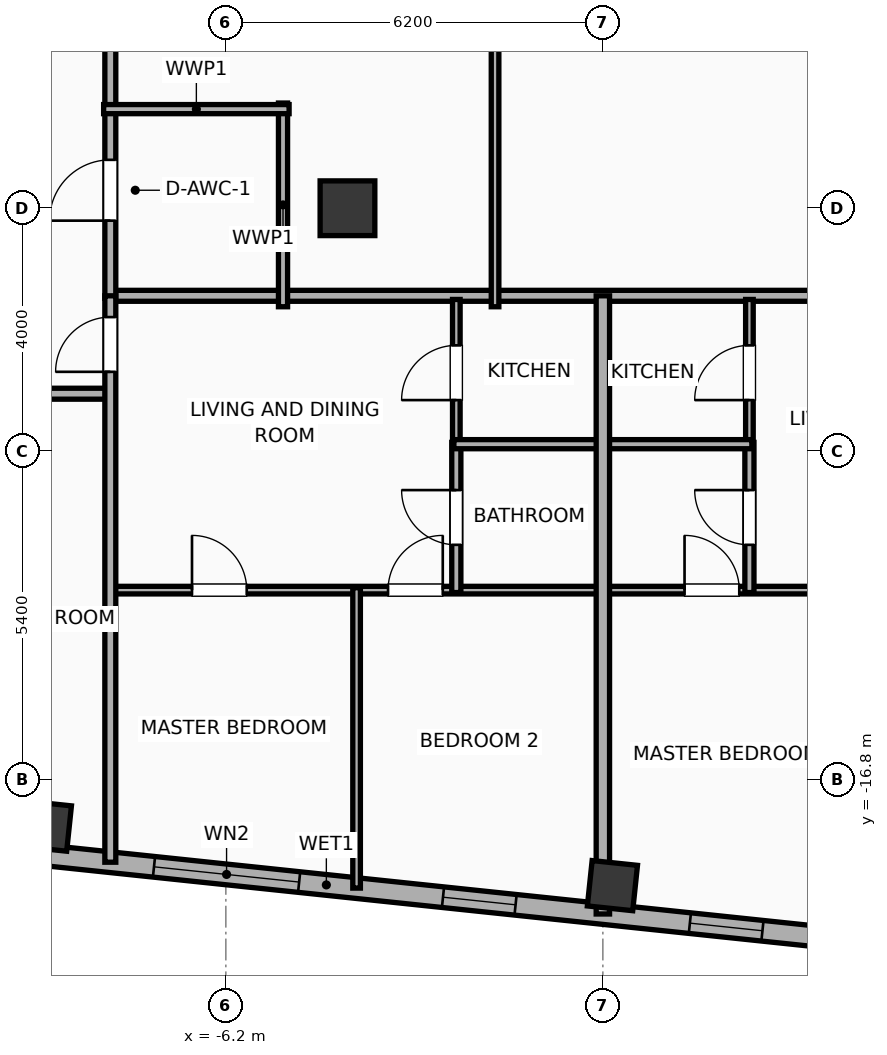
"""IFC4 building model, lengths in metres.
Left out: names, types, materials, properties, quantities, classifications, styles, units other than length and angle.
Written with IfcOpenShell. Run it as: python <this file> out.ifc"""

import sys

from ifc_helpers import new_model, si_unit, direction, frame, frame_2d, origin, origin_2d, place, context, subcontext, project, spatial, rectangle, hollow_rectangle, extrude, element, fill, save


model = new_model("IFC4")
c1 = context("Model", 3, precision=1e-05, world=origin(), true_north=direction((0.0, 1.0)))
c2 = subcontext(c1, "Body", "Model", "MODEL_VIEW")
j1 = project(units=[si_unit("LENGTHUNIT", "METRE"), si_unit("PLANEANGLEUNIT", "RADIAN")], contexts=[c1])
p1 = place(None, origin())
s1 = spatial("IfcSite", under=j1, at=p1, CompositionType="ELEMENT")
p2 = place(p1, origin())
s2 = spatial("IfcBuilding", under=s1, at=p2, CompositionType="ELEMENT")
p3 = place(p2, frame((0.0, 0.0, 263.9)))
s3 = spatial("IfcBuildingStorey", under=s2, at=p3, CompositionType="ELEMENT", Elevation=263.9)
p4 = place(p3, frame((-4.2, -7.4, 0.0), z_axis=(0.0, 0.0, 1.0), x_axis=(1.0, 0.0, 0.0)))
e1 = element("IfcColumn", 1, at=p4, inside=s3, PredefinedType="COLUMN", context=c2, shape_type="SweptSolid", body=[
    extrude(rectangle(XDim=0.9, YDim=0.9, at=origin_2d()), origin(), (0.0, 0.0, 1.0), 3.9),
])
for number, where, z_axis, x_axis in (
    (2, (-9.152, -17.561, 0.0), (0.0, 0.0, 1.0), (0.995, -0.105, 0.0)),
    (3, (0.157, -18.54, 0.0), (0.0, 0.0, 1.0), (0.995, -0.105, 0.0)),
):
    element("IfcColumn", number, at=place(p3, frame(where, z_axis=z_axis, x_axis=x_axis)), inside=s3, PredefinedType="COLUMN", context=c2, shape_type="SweptSolid", body=[
        extrude(hollow_rectangle(XDim=0.75, YDim=0.75, WallThickness=0.025, at=origin_2d()), origin(), (0.0, 0.0, 1.0), 3.9),
    ])
p5 = place(p3, frame((18.708, -20.972, 0.0), z_axis=(0.0, 0.0, 1.0), x_axis=(-0.994521888554, 0.104528528102, 0.0)))
e4 = element("IfcWall", 4, at=p5, inside=s3, PredefinedType="ELEMENTEDWALL", context=c2, shape_type="SweptSolid", body=[
    extrude(rectangle(XDim=46.766, YDim=0.34, at=frame_2d((23.383, 0.0))), origin(), (0.0, 0.0, 1.0), 3.65),
])
p6 = place(p5, frame((23.833, 0.0, 0.75)))
e5 = element("IfcOpeningElement", 5, at=p6, cuts=e4, PredefinedType="OPENING", context=c2, shape_type="SweptSolid", body=[
    extrude(rectangle(XDim=2.4, YDim=2.1, at=frame_2d((1.2, 1.05))), frame((0.0, 0.18, 0.0), z_axis=(0.0, -1.0, 0.0), x_axis=(1.0, 0.0, 0.0)), (0.0, 0.0, 1.0), 0.36),
])
p7 = place(p5, frame((38.622, 0.0, 0.75)))
e6 = element("IfcOpeningElement", 6, at=p7, cuts=e4, PredefinedType="OPENING", context=c2, shape_type="SweptSolid", body=[
    extrude(rectangle(XDim=2.4, YDim=2.1, at=frame_2d((1.2, 1.05))), frame((0.0, 0.18, 0.0), z_axis=(0.0, -1.0, 0.0), x_axis=(1.0, 0.0, 0.0)), (0.0, 0.0, 1.0), 0.36),
])
p8 = place(p5, frame((44.402, 0.0, 0.75)))
e7 = element("IfcOpeningElement", 7, at=p8, cuts=e4, PredefinedType="OPENING", context=c2, shape_type="SweptSolid", body=[
    extrude(rectangle(XDim=1.2, YDim=2.05, at=frame_2d((0.6, 1.025))), frame((0.0, 0.18, 0.0), z_axis=(0.0, -1.0, 0.0), x_axis=(1.0, 0.0, 0.0)), (0.0, 0.0, 1.0), 0.36),
])
p9 = place(p5, frame((42.406, 0.0, 0.75)))
e8 = element("IfcOpeningElement", 8, at=p9, cuts=e4, PredefinedType="OPENING", context=c2, shape_type="SweptSolid", body=[
    extrude(rectangle(XDim=1.2, YDim=2.05, at=frame_2d((0.6, 1.025))), frame((0.0, 0.18, 0.0), z_axis=(0.0, -1.0, 0.0), x_axis=(1.0, 0.0, 0.0)), (0.0, 0.0, 1.0), 0.36),
])
p10 = place(p5, frame((34.933, 0.0, 0.75)))
e9 = element("IfcOpeningElement", 9, at=p10, cuts=e4, PredefinedType="OPENING", context=c2, shape_type="SweptSolid", body=[
    extrude(rectangle(XDim=1.2, YDim=2.05, at=frame_2d((0.6, 1.025))), frame((0.0, 0.18, 0.0), z_axis=(0.0, -1.0, 0.0), x_axis=(1.0, 0.0, 0.0)), (0.0, 0.0, 1.0), 0.36),
])
p11 = place(p5, frame((28.631, 0.0, 0.75)))
e10 = element("IfcOpeningElement", 10, at=p11, cuts=e4, PredefinedType="OPENING", context=c2, shape_type="SweptSolid", body=[
    extrude(rectangle(XDim=1.2, YDim=2.05, at=frame_2d((0.6, 1.025))), frame((0.0, 0.18, 0.0), z_axis=(0.0, -1.0, 0.0), x_axis=(1.0, 0.0, 0.0)), (0.0, 0.0, 1.0), 0.36),
])
p12 = place(p5, frame((30.896, 0.0, 0.75)))
e11 = element("IfcOpeningElement", 11, at=p12, cuts=e4, PredefinedType="OPENING", context=c2, shape_type="SweptSolid", body=[
    extrude(rectangle(XDim=1.2, YDim=2.05, at=frame_2d((0.6, 1.025))), frame((0.0, 0.18, 0.0), z_axis=(0.0, -1.0, 0.0), x_axis=(1.0, 0.0, 0.0)), (0.0, 0.0, 1.0), 0.36),
])
p13 = place(p5, frame((7.501, 0.0, 0.75)))
e12 = element("IfcOpeningElement", 12, at=p13, cuts=e4, PredefinedType="OPENING", context=c2, shape_type="SweptSolid", body=[
    extrude(rectangle(XDim=1.2, YDim=2.05, at=frame_2d((0.6, 1.025))), frame((0.0, 0.18, 0.0), z_axis=(0.0, -1.0, 0.0), x_axis=(1.0, 0.0, 0.0)), (0.0, 0.0, 1.0), 0.36),
])
p14 = place(p5, frame((4.159, 0.0, 0.75)))
e13 = element("IfcOpeningElement", 13, at=p14, cuts=e4, PredefinedType="OPENING", context=c2, shape_type="SweptSolid", body=[
    extrude(rectangle(XDim=1.2, YDim=2.05, at=frame_2d((0.6, 1.025))), frame((0.0, 0.18, 0.0), z_axis=(0.0, -1.0, 0.0), x_axis=(1.0, 0.0, 0.0)), (0.0, 0.0, 1.0), 0.36),
])
p15 = place(p5, frame((1.369, 0.0, 0.75)))
e14 = element("IfcOpeningElement", 14, at=p15, cuts=e4, PredefinedType="OPENING", context=c2, shape_type="SweptSolid", body=[
    extrude(rectangle(XDim=1.2, YDim=2.05, at=frame_2d((0.6, 1.025))), frame((0.0, 0.18, 0.0), z_axis=(0.0, -1.0, 0.0), x_axis=(1.0, 0.0, 0.0)), (0.0, 0.0, 1.0), 0.36),
])
p16 = place(p5, frame((20.254, 0.0, 0.75)))
e15 = element("IfcOpeningElement", 15, at=p16, cuts=e4, PredefinedType="OPENING", context=c2, shape_type="SweptSolid", body=[
    extrude(rectangle(XDim=1.2, YDim=2.05, at=frame_2d((0.6, 1.025))), frame((0.0, 0.18, 0.0), z_axis=(0.0, -1.0, 0.0), x_axis=(1.0, 0.0, 0.0)), (0.0, 0.0, 1.0), 0.36),
])
p17 = place(p5, frame((16.172, 0.0, 0.75)))
e16 = element("IfcOpeningElement", 16, at=p17, cuts=e4, PredefinedType="OPENING", context=c2, shape_type="SweptSolid", body=[
    extrude(rectangle(XDim=1.2, YDim=2.05, at=frame_2d((0.6, 1.025))), frame((0.0, 0.18, 0.0), z_axis=(0.0, -1.0, 0.0), x_axis=(1.0, 0.0, 0.0)), (0.0, 0.0, 1.0), 0.36),
])
p18 = place(p5, frame((12.11, 0.0, 0.75)))
e17 = element("IfcOpeningElement", 17, at=p18, cuts=e4, PredefinedType="OPENING", context=c2, shape_type="SweptSolid", body=[
    extrude(rectangle(XDim=1.2, YDim=2.05, at=frame_2d((0.6, 1.025))), frame((0.0, 0.18, 0.0), z_axis=(0.0, -1.0, 0.0), x_axis=(1.0, 0.0, 0.0)), (0.0, 0.0, 1.0), 0.36),
])
p19 = place(p3, frame((-8.15, -8.84, 0.0), z_axis=(0.0, 0.0, 1.0), x_axis=(1.0, 0.0, 0.0)))
e18 = element("IfcWall", 18, at=p19, inside=s3, PredefinedType="PARTITIONING", context=c2, shape_type="SweptSolid", body=[
    extrude(rectangle(XDim=16.3, YDim=0.18, at=frame_2d((8.15, 0.0))), origin(), (0.0, 0.0, 1.0), 3.65),
])
p20 = place(p3, frame((-8.1, -8.88, 0.0), z_axis=(0.0, 0.0, 1.0), x_axis=(0.0, 1.0, 0.0)))
e19 = element("IfcWall", 19, at=p20, inside=s3, PredefinedType="PARTITIONING", context=c2, shape_type="SweptSolid", body=[
    extrude(rectangle(XDim=17.76, YDim=0.18, at=frame_2d((8.88, 0.0))), origin(), (0.0, 0.0, 1.0), 3.65),
])
p21 = place(p20, frame((1.276, 0.0, 0.0)))
e20 = element("IfcOpeningElement", 20, at=p21, cuts=e19, PredefinedType="OPENING", context=c2, shape_type="SweptSolid", body=[
    extrude(rectangle(XDim=1.0, YDim=2.05, at=frame_2d((0.5, 1.025))), frame((0.0, 0.1, 0.0), z_axis=(0.0, -1.0, 0.0), x_axis=(1.0, 0.0, 0.0)), (0.0, 0.0, 1.0), 0.2),
])
p22 = place(p20, frame((10.181, 0.0, 0.0)))
e21 = element("IfcOpeningElement", 21, at=p22, cuts=e19, PredefinedType="OPENING", context=c2, shape_type="SweptSolid", body=[
    extrude(rectangle(XDim=0.95, YDim=2.05, at=frame_2d((0.475, 1.025))), frame((0.0, 0.1, 0.0), z_axis=(0.0, -1.0, 0.0), x_axis=(1.0, 0.0, 0.0)), (0.0, 0.0, 1.0), 0.2),
])
p23 = place(p3, frame((-5.26, -9.02, 0.0), z_axis=(0.0, 0.0, 1.0), x_axis=(0.0, 1.0, 0.0)))
e22 = element("IfcWall", 22, at=p23, inside=s3, PredefinedType="PLUMBINGWALL", context=c2, shape_type="SweptSolid", body=[
    extrude(rectangle(XDim=3.35, YDim=0.15, at=frame_2d((1.675, 0.0))), origin(), (0.0, 0.0, 1.0), 3.65),
])
p24 = place(p3, frame((-8.21, -5.77, 0.0), z_axis=(0.0, 0.0, 1.0), x_axis=(1.0, 0.0, 0.0)))
e23 = element("IfcWall", 23, at=p24, inside=s3, PredefinedType="PLUMBINGWALL", context=c2, shape_type="SweptSolid", body=[
    extrude(rectangle(XDim=3.05, YDim=0.15, at=frame_2d((1.525, 0.0))), origin(), (0.0, 0.0, 1.0), 3.65),
])
p25 = place(p3, frame((-1.773, -9.02, 0.0), z_axis=(0.0, 0.0, 1.0), x_axis=(0.0, 1.0, 0.0)))
e24 = element("IfcWall", 24, at=p25, inside=s3, PredefinedType="PARTITIONING", context=c2, shape_type="SweptSolid", body=[
    extrude(rectangle(XDim=17.99, YDim=0.125, at=frame_2d((8.995, 0.0))), origin(), (0.0, 0.0, 1.0), 3.65),
])
p26 = place(p25, frame((8.52, 0.0, 0.0)))
e25 = element("IfcOpeningElement", 25, at=p26, cuts=e24, PredefinedType="OPENING", context=c2, shape_type="SweptSolid", body=[
    extrude(rectangle(XDim=0.95, YDim=2.05, at=frame_2d((0.475, 1.025))), frame((0.0, 0.073, 0.0), z_axis=(0.0, -1.0, 0.0), x_axis=(1.0, 0.0, 0.0)), (0.0, 0.0, 1.0), 0.145),
])
p27 = place(p3, frame((-30.676, -10.45, 0.0), z_axis=(0.0, 0.0, 1.0), x_axis=(1.0, 0.0, 0.0)))
e26 = element("IfcWall", 26, at=p27, inside=s3, PredefinedType="PARTITIONING", context=c2, shape_type="SweptSolid", body=[
    extrude(rectangle(XDim=22.596, YDim=0.18, at=frame_2d((11.298, 0.0))), origin(), (0.0, 0.0, 1.0), 3.65),
])
p28 = place(p27, frame((2.336, 0.0, 0.0)))
e27 = element("IfcOpeningElement", 27, at=p28, cuts=e26, PredefinedType="OPENING", context=c2, shape_type="SweptSolid", body=[
    extrude(rectangle(XDim=0.9, YDim=2.05, at=frame_2d((0.45, 1.025))), frame((0.0, 0.1, 0.0), z_axis=(0.0, -1.0, 0.0), x_axis=(1.0, 0.0, 0.0)), (0.0, 0.0, 1.0), 0.2),
])
p29 = place(p27, frame((8.861, 0.0, 0.0)))
e28 = element("IfcOpeningElement", 28, at=p29, cuts=e26, PredefinedType="OPENING", context=c2, shape_type="SweptSolid", body=[
    extrude(rectangle(XDim=1.15, YDim=2.05, at=frame_2d((0.575, 1.025))), frame((0.0, 0.1, 0.0), z_axis=(0.0, -1.0, 0.0), x_axis=(1.0, 0.0, 0.0)), (0.0, 0.0, 1.0), 0.2),
])
p30 = place(p27, frame((13.774, 0.0, 0.0)))
e29 = element("IfcOpeningElement", 29, at=p30, cuts=e26, PredefinedType="OPENING", context=c2, shape_type="SweptSolid", body=[
    extrude(rectangle(XDim=0.9, YDim=2.05, at=frame_2d((0.45, 1.025))), frame((0.0, 0.1, 0.0), z_axis=(0.0, -1.0, 0.0), x_axis=(1.0, 0.0, 0.0)), (0.0, 0.0, 1.0), 0.2),
])
p31 = place(p27, frame((20.306, 0.0, 0.0)))
e30 = element("IfcOpeningElement", 30, at=p31, cuts=e26, PredefinedType="OPENING", context=c2, shape_type="SweptSolid", body=[
    extrude(rectangle(XDim=1.15, YDim=2.05, at=frame_2d((0.575, 1.025))), frame((0.0, 0.1, 0.0), z_axis=(0.0, -1.0, 0.0), x_axis=(1.0, 0.0, 0.0)), (0.0, 0.0, 1.0), 0.2),
])
p32 = place(p3, frame((-8.08, -13.68, 0.0), z_axis=(0.0, 0.0, 1.0), x_axis=(1.0, 0.0, 0.0)))
e31 = element("IfcWall", 31, at=p32, inside=s3, PredefinedType="PARTITIONING", context=c2, shape_type="SweptSolid", body=[
    extrude(rectangle(XDim=8.06, YDim=0.125, at=frame_2d((4.03, 0.0))), origin(), (0.0, 0.0, 1.0), 3.65),
])
p33 = place(p32, frame((1.323, 0.0, 0.0)))
e32 = element("IfcOpeningElement", 32, at=p33, cuts=e31, PredefinedType="OPENING", context=c2, shape_type="SweptSolid", body=[
    extrude(rectangle(XDim=0.9, YDim=2.05, at=frame_2d((0.45, 1.025))), frame((0.0, 0.073, 0.0), z_axis=(0.0, -1.0, 0.0), x_axis=(1.0, 0.0, 0.0)), (0.0, 0.0, 1.0), 0.145),
])
p34 = place(p32, frame((4.547, 0.0, 0.0)))
e33 = element("IfcOpeningElement", 33, at=p34, cuts=e31, PredefinedType="OPENING", context=c2, shape_type="SweptSolid", body=[
    extrude(rectangle(XDim=0.9, YDim=2.05, at=frame_2d((0.45, 1.025))), frame((0.0, 0.073, 0.0), z_axis=(0.0, -1.0, 0.0), x_axis=(1.0, 0.0, 0.0)), (0.0, 0.0, 1.0), 0.145),
])
p35 = place(p3, frame((-2.41, -11.31, 0.0), z_axis=(0.0, 0.0, 1.0), x_axis=(0.0, 1.0, 0.0)))
e34 = element("IfcWall", 34, at=p35, inside=s3, PredefinedType="PARTITIONING", context=c2, shape_type="SweptSolid", body=[
    extrude(rectangle(XDim=2.41, YDim=0.125, at=frame_2d((1.205, 0.0))), origin(), (0.0, 0.0, 1.0), 3.65),
])
p36 = place(p35, frame((0.755, 0.0, 0.0)))
e35 = element("IfcOpeningElement", 35, at=p36, cuts=e34, PredefinedType="OPENING", context=c2, shape_type="SweptSolid", body=[
    extrude(rectangle(XDim=0.9, YDim=2.05, at=frame_2d((0.45, 1.025))), frame((0.0, 0.073, 0.0), z_axis=(0.0, -1.0, 0.0), x_axis=(1.0, 0.0, 0.0)), (0.0, 0.0, 1.0), 0.145),
])
p37 = place(p3, frame((-2.41, -13.72, 0.0), z_axis=(0.0, 0.0, 1.0), x_axis=(0.0, 1.0, 0.0)))
e36 = element("IfcWall", 36, at=p37, inside=s3, PredefinedType="PLUMBINGWALL", context=c2, shape_type="SweptSolid", body=[
    extrude(rectangle(XDim=2.47, YDim=0.15, at=frame_2d((1.235, 0.0))), origin(), (0.0, 0.0, 1.0), 3.65),
])
p38 = place(p37, frame((0.785, 0.0, 0.0)))
e37 = element("IfcOpeningElement", 37, at=p38, cuts=e36, PredefinedType="OPENING", context=c2, shape_type="SweptSolid", body=[
    extrude(rectangle(XDim=0.9, YDim=2.05, at=frame_2d((0.45, 1.025))), frame((0.0, 0.085, 0.0), z_axis=(0.0, -1.0, 0.0), x_axis=(1.0, 0.0, 0.0)), (0.0, 0.0, 1.0), 0.17),
])
p39 = place(p3, frame((-2.45, -11.28, 0.0), z_axis=(0.0, 0.0, 1.0), x_axis=(1.0, 0.0, 0.0)))
e38 = element("IfcWall", 38, at=p39, inside=s3, PredefinedType="PLUMBINGWALL", context=c2, shape_type="SweptSolid", body=[
    extrude(rectangle(XDim=2.43, YDim=0.15, at=frame_2d((1.215, 0.0))), origin(), (0.0, 0.0, 1.0), 3.65),
])
p40 = place(p3, frame((-4.05, -18.58, 0.0), z_axis=(0.0, 0.0, 1.0), x_axis=(0.0, 1.0, 0.0)))
e39 = element("IfcWall", 39, at=p40, inside=s3, PredefinedType="PARTITIONING", context=c2, shape_type="SweptSolid", body=[
    extrude(rectangle(XDim=4.94, YDim=0.125, at=frame_2d((2.47, 0.0))), origin(), (0.0, 0.0, 1.0), 3.65),
])
p41 = place(p3, frame((-8.1, -18.155, 0.0), z_axis=(0.0, 0.0, 1.0), x_axis=(0.0, 1.0, 0.0)))
e40 = element("IfcWall", 40, at=p41, inside=s3, PredefinedType="PARTITIONING", context=c2, shape_type="SweptSolid", body=[
    extrude(rectangle(XDim=9.314, YDim=0.18, at=frame_2d((4.657, 0.0))), origin(), (0.0, 0.0, 1.0), 3.65),
])
p42 = place(p41, frame((8.064, 0.0, 0.0)))
e41 = element("IfcOpeningElement", 41, at=p42, cuts=e40, PredefinedType="OPENING", context=c2, shape_type="SweptSolid", body=[
    extrude(rectangle(XDim=0.9, YDim=2.05, at=frame_2d((0.45, 1.025))), frame((0.0, 0.1, 0.0), z_axis=(0.0, -1.0, 0.0), x_axis=(1.0, 0.0, 0.0)), (0.0, 0.0, 1.0), 0.2),
])
p43 = place(p3, frame((0.02, -13.68, 0.0), z_axis=(0.0, 0.0, 1.0), x_axis=(1.0, 0.0, 0.0)))
e42 = element("IfcWall", 42, at=p43, inside=s3, PredefinedType="PARTITIONING", context=c2, shape_type="SweptSolid", body=[
    extrude(rectangle(XDim=7.992, YDim=0.125, at=frame_2d((3.996, 0.0))), origin(), (0.0, 0.0, 1.0), 3.65),
])
p44 = place(p43, frame((1.323, 0.0, 0.0)))
e43 = element("IfcOpeningElement", 43, at=p44, cuts=e42, PredefinedType="OPENING", context=c2, shape_type="SweptSolid", body=[
    extrude(rectangle(XDim=0.9, YDim=2.05, at=frame_2d((0.45, 1.025))), frame((0.0, 0.073, 0.0), z_axis=(0.0, -1.0, 0.0), x_axis=(1.0, 0.0, 0.0)), (0.0, 0.0, 1.0), 0.145),
])
p45 = place(p43, frame((5.837, 0.0, 0.0)))
e44 = element("IfcOpeningElement", 44, at=p45, cuts=e42, PredefinedType="OPENING", context=c2, shape_type="SweptSolid", body=[
    extrude(rectangle(XDim=0.9, YDim=2.05, at=frame_2d((0.45, 1.025))), frame((0.0, 0.073, 0.0), z_axis=(0.0, -1.0, 0.0), x_axis=(1.0, 0.0, 0.0)), (0.0, 0.0, 1.0), 0.145),
])
p46 = place(p3, frame((2.41, -11.31, 0.0), z_axis=(0.0, 0.0, 1.0), x_axis=(0.0, 1.0, 0.0)))
e45 = element("IfcWall", 45, at=p46, inside=s3, PredefinedType="PARTITIONING", context=c2, shape_type="SweptSolid", body=[
    extrude(rectangle(XDim=2.41, YDim=0.125, at=frame_2d((1.205, 0.0))), origin(), (0.0, 0.0, 1.0), 3.65),
])
p47 = place(p46, frame((0.755, 0.0, 0.0)))
e46 = element("IfcOpeningElement", 46, at=p47, cuts=e45, PredefinedType="OPENING", context=c2, shape_type="SweptSolid", body=[
    extrude(rectangle(XDim=0.9, YDim=2.05, at=frame_2d((0.45, 1.025))), frame((0.0, 0.073, 0.0), z_axis=(0.0, -1.0, 0.0), x_axis=(1.0, 0.0, 0.0)), (0.0, 0.0, 1.0), 0.145),
])
p48 = place(p3, frame((2.41, -13.72, 0.0), z_axis=(0.0, 0.0, 1.0), x_axis=(0.0, 1.0, 0.0)))
e47 = element("IfcWall", 47, at=p48, inside=s3, PredefinedType="PLUMBINGWALL", context=c2, shape_type="SweptSolid", body=[
    extrude(rectangle(XDim=2.47, YDim=0.15, at=frame_2d((1.235, 0.0))), origin(), (0.0, 0.0, 1.0), 3.09),
])
p49 = place(p48, frame((0.785, 0.0, 0.0)))
e48 = element("IfcOpeningElement", 48, at=p49, cuts=e47, PredefinedType="OPENING", context=c2, shape_type="SweptSolid", body=[
    extrude(rectangle(XDim=0.9, YDim=2.05, at=frame_2d((0.45, 1.025))), frame((0.0, 0.085, 0.0), z_axis=(0.0, -1.0, 0.0), x_axis=(1.0, 0.0, 0.0)), (0.0, 0.0, 1.0), 0.17),
])
p50 = place(p3, frame((0.02, -11.28, 0.0), z_axis=(0.0, 0.0, 1.0), x_axis=(1.0, 0.0, 0.0)))
e49 = element("IfcWall", 49, at=p50, inside=s3, PredefinedType="PLUMBINGWALL", context=c2, shape_type="SweptSolid", body=[
    extrude(rectangle(XDim=2.43, YDim=0.15, at=frame_2d((1.215, 0.0))), origin(), (0.0, 0.0, 1.0), 3.65),
])
p51 = place(p3, frame((0.0, -19.006, 0.0), z_axis=(0.0, 0.0, 1.0), x_axis=(0.0, 1.0, 0.0)))
e50 = element("IfcWall", 50, at=p51, inside=s3, PredefinedType="PARTITIONING", context=c2, shape_type="SweptSolid", body=[
    extrude(rectangle(XDim=10.166, YDim=0.22, at=frame_2d((5.083, 0.0))), origin(), (0.0, 0.0, 1.0), 3.65),
])
p52 = place(p6, origin())
e51 = element("IfcWindow", 51, at=p52, inside=s3, PartitioningType="SINGLE_PANEL", PredefinedType="WINDOW", context=c2, shape_type="SweptSolid", body=[
    extrude(rectangle(XDim=2.4, YDim=2.1, at=frame_2d((1.2, 1.05))), frame((0.0, 0.03, 0.0), z_axis=(0.0, -1.0, 0.0), x_axis=(1.0, 0.0, 0.0)), (0.0, 0.0, 1.0), 0.06),
])
fill(e5, e51)
p53 = place(p16, origin())
e52 = element("IfcWindow", 52, at=p53, inside=s3, PartitioningType="SINGLE_PANEL", PredefinedType="WINDOW", context=c2, shape_type="SweptSolid", body=[
    extrude(rectangle(XDim=1.2, YDim=2.05, at=frame_2d((0.6, 1.025))), frame((0.0, 0.03, 0.0), z_axis=(0.0, -1.0, 0.0), x_axis=(1.0, 0.0, 0.0)), (0.0, 0.0, 1.0), 0.06),
])
fill(e15, e52)
p54 = place(p17, origin())
e53 = element("IfcWindow", 53, at=p54, inside=s3, PartitioningType="SINGLE_PANEL", PredefinedType="WINDOW", context=c2, shape_type="SweptSolid", body=[
    extrude(rectangle(XDim=1.2, YDim=2.05, at=frame_2d((0.6, 1.025))), frame((0.0, 0.03, 0.0), z_axis=(0.0, -1.0, 0.0), x_axis=(1.0, 0.0, 0.0)), (0.0, 0.0, 1.0), 0.06),
])
fill(e16, e53)
p55 = place(p21, origin())
e54 = element("IfcDoor", 54, at=p55, inside=s3, OperationType="SINGLE_SWING_LEFT", PredefinedType="DOOR", context=c2, shape_type="SweptSolid", body=[
    extrude(rectangle(XDim=1.0, YDim=2.05, at=frame_2d((0.5, 1.025))), frame((0.0, 0.025, 0.0), z_axis=(0.0, -1.0, 0.0), x_axis=(1.0, 0.0, 0.0)), (0.0, 0.0, 1.0), 0.05),
])
fill(e20, e54)
p56 = place(p33, origin())
e55 = element("IfcDoor", 55, at=p56, inside=s3, OperationType="SINGLE_SWING_LEFT", PredefinedType="DOOR", context=c2, shape_type="SweptSolid", body=[
    extrude(rectangle(XDim=0.9, YDim=2.05, at=frame_2d((0.45, 1.025))), frame((0.0, 0.025, 0.0), z_axis=(0.0, -1.0, 0.0), x_axis=(1.0, 0.0, 0.0)), (0.0, 0.0, 1.0), 0.05),
])
fill(e32, e55)
p57 = place(p34, origin())
e56 = element("IfcDoor", 56, at=p57, inside=s3, OperationType="SINGLE_SWING_RIGHT", PredefinedType="DOOR", context=c2, shape_type="SweptSolid", body=[
    extrude(rectangle(XDim=0.9, YDim=2.05, at=frame_2d((0.45, 1.025))), frame((0.0, 0.025, 0.0), z_axis=(0.0, -1.0, 0.0), x_axis=(1.0, 0.0, 0.0)), (0.0, 0.0, 1.0), 0.05),
])
fill(e33, e56)
p58 = place(p36, origin())
e57 = element("IfcDoor", 57, at=p58, inside=s3, OperationType="SINGLE_SWING_LEFT", PredefinedType="DOOR", context=c2, shape_type="SweptSolid", body=[
    extrude(rectangle(XDim=0.9, YDim=2.05, at=frame_2d((0.45, 1.025))), frame((0.0, 0.025, 0.0), z_axis=(0.0, -1.0, 0.0), x_axis=(1.0, 0.0, 0.0)), (0.0, 0.0, 1.0), 0.05),
])
fill(e35, e57)
p59 = place(p38, origin())
e58 = element("IfcDoor", 58, at=p59, inside=s3, OperationType="SINGLE_SWING_RIGHT", PredefinedType="DOOR", context=c2, shape_type="SweptSolid", body=[
    extrude(rectangle(XDim=0.9, YDim=2.05, at=frame_2d((0.45, 1.025))), frame((0.0, 0.025, 0.0), z_axis=(0.0, -1.0, 0.0), x_axis=(1.0, 0.0, 0.0)), (0.0, 0.0, 1.0), 0.05),
])
fill(e37, e58)
p60 = place(p42, origin())
e59 = element("IfcDoor", 59, at=p60, inside=s3, OperationType="SINGLE_SWING_LEFT", PredefinedType="DOOR", context=c2, shape_type="SweptSolid", body=[
    extrude(rectangle(XDim=0.9, YDim=2.05, at=frame_2d((0.45, 1.025))), frame((0.0, 0.025, 0.0), z_axis=(0.0, -1.0, 0.0), x_axis=(1.0, 0.0, 0.0)), (0.0, 0.0, 1.0), 0.05),
])
fill(e41, e59)
p61 = place(p44, origin())
e60 = element("IfcDoor", 60, at=p61, inside=s3, OperationType="SINGLE_SWING_LEFT", PredefinedType="DOOR", context=c2, shape_type="SweptSolid", body=[
    extrude(rectangle(XDim=0.9, YDim=2.05, at=frame_2d((0.45, 1.025))), frame((0.0, 0.025, 0.0), z_axis=(0.0, -1.0, 0.0), x_axis=(1.0, 0.0, 0.0)), (0.0, 0.0, 1.0), 0.05),
])
fill(e43, e60)
p62 = place(p47, origin())
e61 = element("IfcDoor", 61, at=p62, inside=s3, OperationType="SINGLE_SWING_LEFT", PredefinedType="DOOR", context=c2, shape_type="SweptSolid", body=[
    extrude(rectangle(XDim=0.9, YDim=2.05, at=frame_2d((0.45, 1.025))), frame((0.0, 0.025, 0.0), z_axis=(0.0, -1.0, 0.0), x_axis=(1.0, 0.0, 0.0)), (0.0, 0.0, 1.0), 0.05),
])
fill(e46, e61)
p63 = place(p49, origin())
e62 = element("IfcDoor", 62, at=p63, inside=s3, OperationType="SINGLE_SWING_RIGHT", PredefinedType="DOOR", context=c2, shape_type="SweptSolid", body=[
    extrude(rectangle(XDim=0.9, YDim=2.05, at=frame_2d((0.45, 1.025))), frame((0.0, 0.025, 0.0), z_axis=(0.0, -1.0, 0.0), x_axis=(1.0, 0.0, 0.0)), (0.0, 0.0, 1.0), 0.05),
])
fill(e48, e62)
save(model, sys.argv[1])
